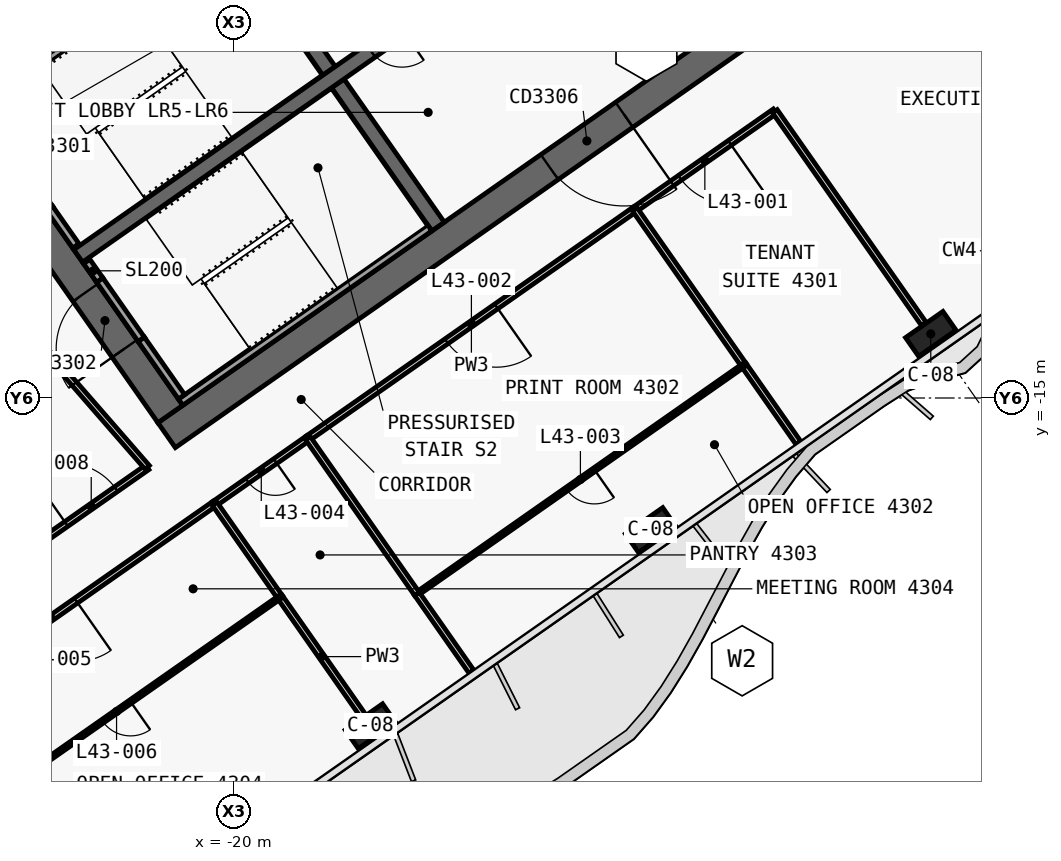
"""IFC4 building model, lengths in metres.
Left out: names, types, materials, properties, quantities, classifications, styles, units other than length and angle.
Written with IfcOpenShell. Run it as: python <this file> out.ifc"""

import sys

from ifc_helpers import new_model, si_unit, direction, frame, frame_2d, origin, origin_2d, place, context, subcontext, project, spatial, polyline, rectangle, outline, extrude, element, fill, save


model = new_model("IFC4")
c1 = context("Model", 3, precision=1e-05, world=origin(), true_north=direction((0.0, 1.0)))
c2 = subcontext(c1, "Body", "Model", "MODEL_VIEW")
j1 = project(units=[si_unit("LENGTHUNIT", "METRE"), si_unit("PLANEANGLEUNIT", "RADIAN")], contexts=[c1])
p1 = place(None, origin())
s1 = spatial("IfcSite", under=j1, at=p1, CompositionType="ELEMENT")
p2 = place(p1, origin())
s2 = spatial("IfcBuilding", under=s1, at=p2, CompositionType="ELEMENT")
p3 = place(p2, frame((0.0, 0.0, 186.6)))
s3 = spatial("IfcBuildingStorey", under=s2, at=p3, CompositionType="ELEMENT", Elevation=186.6)
p4 = place(p3, frame((0.029, 11.984, 0.0), z_axis=(0.0, 0.0, 1.0), x_axis=(-0.819151382952, -0.573577380837, 0.0)))
e1 = element("IfcWall", 1, at=p4, inside=s3, PredefinedType="SHEAR", context=c2, shape_type="SweptSolid", body=[
    extrude(outline(polyline([(33.898, 0.4), (0.56, 0.4), (-0.0, -0.4), (33.898, -0.4), (33.898, 0.4)])), origin(), (0.0, 0.0, 1.0), 3.9),
])
p5 = place(p3, frame((0.029, -0.712, 0.0), z_axis=(0.0, 0.0, 1.0), x_axis=(-0.819151758019, -0.573576845187, 0.0)))
e2 = element("IfcWall", 2, at=p5, inside=s3, PredefinedType="SHEAR", context=c2, shape_type="SweptSolid", body=[
    extrude(outline(polyline([(26.616, 0.4), (0.56, 0.4), (-0.0, -0.4), (26.616, -0.4), (26.616, 0.4)])), origin(), (0.0, 0.0, 1.0), 3.9),
])
p6 = place(p5, frame((2.966, 0.0, 0.0)))
e3 = element("IfcOpeningElement", 3, at=p6, cuts=e2, PredefinedType="OPENING", context=c2, shape_type="SweptSolid", body=[
    extrude(rectangle(XDim=2.4, YDim=2.1, at=frame_2d((1.2, 1.05))), frame((0.0, 0.41, 0.0), z_axis=(0.0, -1.0, 0.0), x_axis=(1.0, 0.0, 0.0)), (0.0, 0.0, 1.0), 0.82),
])
p7 = place(p5, frame((11.916, 0.0, 0.0)))
e4 = element("IfcOpeningElement", 4, at=p7, cuts=e2, PredefinedType="OPENING", context=c2, shape_type="SweptSolid", body=[
    extrude(rectangle(XDim=2.4, YDim=2.1, at=frame_2d((1.2, 1.05))), frame((0.0, 0.41, 0.0), z_axis=(0.0, -1.0, 0.0), x_axis=(1.0, 0.0, 0.0)), (0.0, 0.0, 1.0), 0.82),
])
p8 = place(p3, frame((-21.675, -15.421, 0.0), z_axis=(0.0, 0.0, 1.0), x_axis=(-0.573581815061, 0.819148278049, 0.0)))
e5 = element("IfcWall", 5, at=p8, inside=s3, PredefinedType="SHEAR", context=c2, shape_type="SweptSolid", body=[
    extrude(outline(polyline([(0.0, 0.4), (0.0, -0.4), (9.6, -0.4), (9.6, 0.4), (0.0, 0.4)])), origin(), (0.0, 0.0, 1.0), 3.9),
])
p9 = place(p8, frame((6.3, 0.0, 0.0)))
e6 = element("IfcOpeningElement", 6, at=p9, cuts=e5, PredefinedType="OPENING", context=c2, shape_type="SweptSolid", body=[
    extrude(rectangle(XDim=1.8, YDim=2.1, at=frame_2d((0.9, 1.05))), frame((0.0, 0.41, 0.0), z_axis=(0.0, -1.0, 0.0), x_axis=(1.0, 0.0, 0.0)), (0.0, 0.0, 1.0), 0.82),
])
p10 = place(p8, frame((2.1, 0.0, 0.0)))
e7 = element("IfcOpeningElement", 7, at=p10, cuts=e5, PredefinedType="OPENING", context=c2, shape_type="SweptSolid", body=[
    extrude(rectangle(XDim=1.8, YDim=2.1, at=frame_2d((0.9, 1.05))), frame((0.0, 0.41, 0.0), z_axis=(0.0, -1.0, 0.0), x_axis=(1.0, 0.0, 0.0)), (0.0, 0.0, 1.0), 0.82),
])
p11 = place(p3, frame((-14.63, -10.488, 0.0), z_axis=(0.0, 0.0, 1.0), x_axis=(-0.573611936273, 0.819127185829, 0.0)))
e8 = element("IfcWall", 8, at=p11, inside=s3, PredefinedType="SHEAR", context=c2, shape_type="SweptSolid", body=[
    extrude(outline(polyline([(4.6, 0.2), (0.0, 0.2), (0.0, -0.2), (4.6, -0.2), (4.6, 0.2)])), origin(), (0.0, 0.0, 1.0), 3.9),
])
p12 = place(p3, frame((-17.498, -6.392, 0.0), z_axis=(0.0, 0.0, 1.0), x_axis=(-0.573611936273, 0.819127185829, 0.0)))
e9 = element("IfcWall", 9, at=p12, inside=s3, PredefinedType="SHEAR", context=c2, shape_type="SweptSolid", body=[
    extrude(outline(polyline([(4.6, -0.2), (4.6, 0.2), (0.0, 0.2), (0.0, -0.2), (4.6, -0.2)])), origin(), (0.0, 0.0, 1.0), 3.9),
])
p13 = place(p3, frame((-2.638, 3.768, 0.0), z_axis=(0.0, 0.0, 1.0), x_axis=(-0.81915267502, -0.573575535572, 0.0)))
e10 = element("IfcWall", 10, at=p13, inside=s3, PredefinedType="SHEAR", context=c2, shape_type="SweptSolid", body=[
    extrude(outline(polyline([(26.2, 0.2), (0.0, 0.2), (0.0, -0.2), (26.2, -0.2), (26.2, 0.2)])), origin(), (0.0, 0.0, 1.0), 3.9),
])
p14 = place(p13, frame((1.169, 0.0, 0.0)))
e11 = element("IfcOpeningElement", 11, at=p14, cuts=e10, PredefinedType="OPENING", context=c2, shape_type="SweptSolid", body=[
    extrude(rectangle(XDim=1.1, YDim=2.1, at=frame_2d((0.55, 1.05))), frame((0.0, 0.21, 0.0), z_axis=(0.0, -1.0, 0.0), x_axis=(1.0, 0.0, 0.0)), (0.0, 0.0, 1.0), 0.42),
])
p15 = place(p13, frame((3.206, 0.0, 0.0)))
e12 = element("IfcOpeningElement", 12, at=p15, cuts=e10, PredefinedType="OPENING", context=c2, shape_type="SweptSolid", body=[
    extrude(rectangle(XDim=1.1, YDim=2.1, at=frame_2d((0.55, 1.05))), frame((0.0, 0.21, 0.0), z_axis=(0.0, -1.0, 0.0), x_axis=(1.0, 0.0, 0.0)), (0.0, 0.0, 1.0), 0.42),
])
p16 = place(p13, frame((5.244, 0.0, 0.0)))
e13 = element("IfcOpeningElement", 13, at=p16, cuts=e10, PredefinedType="OPENING", context=c2, shape_type="SweptSolid", body=[
    extrude(rectangle(XDim=1.1, YDim=2.1, at=frame_2d((0.55, 1.05))), frame((0.0, 0.21, 0.0), z_axis=(0.0, -1.0, 0.0), x_axis=(1.0, 0.0, 0.0)), (0.0, 0.0, 1.0), 0.42),
])
p17 = place(p13, frame((7.281, 0.0, 0.0)))
e14 = element("IfcOpeningElement", 14, at=p17, cuts=e10, PredefinedType="OPENING", context=c2, shape_type="SweptSolid", body=[
    extrude(rectangle(XDim=1.1, YDim=2.1, at=frame_2d((0.55, 1.05))), frame((0.0, 0.21, 0.0), z_axis=(0.0, -1.0, 0.0), x_axis=(1.0, 0.0, 0.0)), (0.0, 0.0, 1.0), 0.42),
])
p18 = place(p13, frame((9.688, 0.0, 0.0)))
e15 = element("IfcOpeningElement", 15, at=p18, cuts=e10, PredefinedType="OPENING", context=c2, shape_type="SweptSolid", body=[
    extrude(rectangle(XDim=1.1, YDim=2.1, at=frame_2d((0.55, 1.05))), frame((0.0, 0.21, 0.0), z_axis=(0.0, -1.0, 0.0), x_axis=(1.0, 0.0, 0.0)), (0.0, 0.0, 1.0), 0.42),
])
p19 = place(p13, frame((11.863, 0.0, 0.0)))
e16 = element("IfcOpeningElement", 16, at=p19, cuts=e10, PredefinedType="OPENING", context=c2, shape_type="SweptSolid", body=[
    extrude(rectangle(XDim=1.1, YDim=2.1, at=frame_2d((0.55, 1.05))), frame((0.0, 0.21, 0.0), z_axis=(0.0, -1.0, 0.0), x_axis=(1.0, 0.0, 0.0)), (0.0, 0.0, 1.0), 0.42),
])
p20 = place(p13, frame((13.722, 0.0, 0.0)))
e17 = element("IfcOpeningElement", 17, at=p20, cuts=e10, PredefinedType="OPENING", context=c2, shape_type="SweptSolid", body=[
    extrude(rectangle(XDim=1.0, YDim=2.1, at=frame_2d((0.5, 1.05))), frame((0.0, 0.21, 0.0), z_axis=(0.0, -1.0, 0.0), x_axis=(1.0, 0.0, 0.0)), (0.0, 0.0, 1.0), 0.42),
])
p21 = place(p13, frame((15.798, 0.0, 0.0)))
e18 = element("IfcOpeningElement", 18, at=p21, cuts=e10, PredefinedType="OPENING", context=c2, shape_type="SweptSolid", body=[
    extrude(rectangle(XDim=1.0, YDim=2.1, at=frame_2d((0.5, 1.05))), frame((0.0, 0.21, 0.0), z_axis=(0.0, -1.0, 0.0), x_axis=(1.0, 0.0, 0.0)), (0.0, 0.0, 1.0), 0.42),
])
for number, where, z_axis, x_axis in (
    (19, (-1.665, -13.313, 0.0), (0.0, 0.0, 1.0), (-0.819, -0.574, 0.0)),
    (20, (-9.038, -18.475, 0.0), (0.0, 0.0, 1.0), (-0.819, -0.574, 0.0)),
    (21, (-16.41, -23.637, 0.0), (0.0, 0.0, 1.0), (-0.819, -0.574, 0.0)),
):
    element("IfcColumn", number, at=place(p3, frame(where, z_axis=z_axis, x_axis=x_axis)), inside=s3, PredefinedType="COLUMN", context=c2, shape_type="SweptSolid", body=[
        extrude(rectangle(XDim=1.2, YDim=0.6, at=origin_2d()), origin(), (0.0, 0.0, 1.0), 3.9),
    ])
p22 = place(p3, frame((-20.243, -2.821, 0.0), z_axis=(0.0, 0.0, 1.0), x_axis=(-0.819141584393, -0.57359137434, 0.0)))
e22 = element("IfcWall", 22, at=p22, inside=s3, PredefinedType="SOLIDWALL", context=c2, shape_type="SweptSolid", body=[
    extrude(rectangle(XDim=8.0, YDim=0.2, at=frame_2d((4.0, 0.0))), origin(), (0.0, 0.0, 1.0), 3.62),
])
p23 = place(p3, frame((-24.162, -10.998, 0.0), z_axis=(0.0, 0.0, 1.0), x_axis=(-0.573612502218, 0.819126789514, 0.0)))
e23 = element("IfcWall", 23, at=p23, inside=s3, PredefinedType="SOLIDWALL", context=c2, shape_type="SweptSolid", body=[
    extrude(rectangle(XDim=1.2, YDim=0.2, at=frame_2d((0.6, 0.0))), origin(), (0.0, 0.0, 1.0), 3.62),
])
p24 = place(p3, frame((-24.85, -10.014, 2.15), z_axis=(0.0, 0.0, 1.0), x_axis=(-0.573505465124, 0.819201734296, 0.0)))
e24 = element("IfcWall", 24, at=p24, inside=s3, PredefinedType="SOLIDWALL", context=c2, shape_type="SweptSolid", body=[
    extrude(rectangle(XDim=1.9, YDim=0.2, at=frame_2d((0.95, 0.0))), origin(), (0.0, 0.0, 1.0), 1.47),
])
p25 = place(p3, frame((-14.851, -10.521, 0.0), z_axis=(0.0, 0.0, 1.0), x_axis=(-0.819141584393, -0.57359137434, 0.0)))
e25 = element("IfcWall", 25, at=p25, inside=s3, PredefinedType="SOLIDWALL", context=c2, shape_type="SweptSolid", body=[
    extrude(rectangle(XDim=8.0, YDim=0.2, at=frame_2d((4.0, 0.0))), origin(), (0.0, 0.0, 1.0), 3.62),
])
p26 = place(p3, frame((-21.38, -14.97, 0.0), z_axis=(0.0, 0.0, 1.0), x_axis=(-0.573559770908, 0.819163713305, 0.0)))
e26 = element("IfcWall", 26, at=p26, inside=s3, PredefinedType="SOLIDWALL", context=c2, shape_type="SweptSolid", body=[
    extrude(rectangle(XDim=1.85, YDim=0.2, at=frame_2d((0.925, 0.0))), origin(), (0.0, 0.0, 1.0), 3.62),
])
p27 = place(p3, frame((-23.531, -11.898, 0.0), z_axis=(0.0, 0.0, 1.0), x_axis=(-0.573708088123, 0.819059844958, 0.0)))
e27 = element("IfcWall", 27, at=p27, inside=s3, PredefinedType="SOLIDWALL", context=c2, shape_type="SweptSolid", body=[
    extrude(rectangle(XDim=0.6, YDim=0.2, at=frame_2d((0.3, 0.0))), origin(), (0.0, 0.0, 1.0), 3.62),
])
p28 = place(p3, frame((-22.441, -13.455, 2.15), z_axis=(0.0, 0.0, 1.0), x_axis=(-0.573591692345, 0.819141361715, 0.0)))
e28 = element("IfcWall", 28, at=p28, inside=s3, PredefinedType="SOLIDWALL", context=c2, shape_type="SweptSolid", body=[
    extrude(rectangle(XDim=1.9, YDim=0.2, at=frame_2d((0.95, 0.0))), origin(), (0.0, 0.0, 1.0), 1.47),
])
p29 = place(p3, frame((-25.231, -18.888, 0.0), z_axis=(0.0, 0.0, 1.0), x_axis=(0.819152236293, 0.573576162141, 0.0)))
e29 = element("IfcWall", 29, at=p29, inside=s3, PredefinedType="PARTITIONING", context=c2, shape_type="SweptSolid", body=[
    extrude(rectangle(XDim=3.599, YDim=0.15, at=frame_2d((1.799, 0.0))), origin(), (0.0, 0.0, 1.0), 3.0),
])
p30 = place(p29, frame((1.0, 0.0, 0.0)))
e30 = element("IfcOpeningElement", 30, at=p30, cuts=e29, PredefinedType="OPENING", context=c2, shape_type="SweptSolid", body=[
    extrude(rectangle(XDim=1.6, YDim=2.1, at=frame_2d((0.8, 1.05))), frame((0.0, 0.085, 0.0), z_axis=(0.0, -1.0, 0.0), x_axis=(1.0, 0.0, 0.0)), (0.0, 0.0, 1.0), 0.17),
])
p31 = place(p3, frame((-5.766, -7.456, 0.0), z_axis=(0.0, 0.0, 1.0), x_axis=(-0.819142740634, -0.573589723117, 0.0)))
e31 = element("IfcWall", 31, at=p31, inside=s3, PredefinedType="PARTITIONING", context=c2, shape_type="SweptSolid", body=[
    extrude(rectangle(XDim=4.502, YDim=0.15, at=frame_2d((2.251, 0.0))), origin(), (0.0, 0.0, 1.0), 3.0),
])
p32 = place(p31, frame((1.451, 0.0, 0.0)))
e32 = element("IfcOpeningElement", 32, at=p32, cuts=e31, PredefinedType="OPENING", context=c2, shape_type="SweptSolid", body=[
    extrude(rectangle(XDim=1.6, YDim=2.1, at=frame_2d((0.8, 1.05))), frame((0.0, 0.085, 0.0), z_axis=(0.0, -1.0, 0.0), x_axis=(1.0, 0.0, 0.0)), (0.0, 0.0, 1.0), 0.17),
])
p33 = place(p3, frame((-9.451, -10.036, 0.0), z_axis=(0.0, 0.0, 1.0), x_axis=(-0.819164214721, -0.57355905478, 0.0)))
e33 = element("IfcWall", 33, at=p33, inside=s3, PredefinedType="PARTITIONING", context=c2, shape_type="SweptSolid", body=[
    extrude(rectangle(XDim=10.504, YDim=0.15, at=frame_2d((5.252, 0.0))), origin(), (0.0, 0.0, 1.0), 3.0),
])
p34 = place(p33, frame((4.452, 0.0, 0.0)))
e34 = element("IfcOpeningElement", 34, at=p34, cuts=e33, PredefinedType="OPENING", context=c2, shape_type="SweptSolid", body=[
    extrude(rectangle(XDim=1.6, YDim=2.1, at=frame_2d((0.8, 1.05))), frame((0.0, 0.085, 0.0), z_axis=(0.0, -1.0, 0.0), x_axis=(1.0, 0.0, 0.0)), (0.0, 0.0, 1.0), 0.17),
])
p35 = place(p3, frame((-18.052, -16.058, 0.0), z_axis=(0.0, 0.0, 1.0), x_axis=(-0.819128818764, -0.573609604409, 0.0)))
e35 = element("IfcWall", 35, at=p35, inside=s3, PredefinedType="PARTITIONING", context=c2, shape_type="SweptSolid", body=[
    extrude(rectangle(XDim=3.004, YDim=0.15, at=frame_2d((1.502, 0.0))), origin(), (0.0, 0.0, 1.0), 3.0),
])
p36 = place(p35, frame((1.052, 0.0, 0.0)))
e36 = element("IfcOpeningElement", 36, at=p36, cuts=e35, PredefinedType="OPENING", context=c2, shape_type="SweptSolid", body=[
    extrude(rectangle(XDim=0.9, YDim=2.1, at=frame_2d((0.45, 1.05))), frame((0.0, 0.085, 0.0), z_axis=(0.0, -1.0, 0.0), x_axis=(1.0, 0.0, 0.0)), (0.0, 0.0, 1.0), 0.17),
])
p37 = place(p3, frame((-20.51, -17.779, 0.0), z_axis=(0.0, 0.0, 1.0), x_axis=(-0.819145647741, -0.57358557146, 0.0)))
e37 = element("IfcWall", 37, at=p37, inside=s3, PredefinedType="PARTITIONING", context=c2, shape_type="SweptSolid", body=[
    extrude(rectangle(XDim=10.504, YDim=0.15, at=frame_2d((5.252, 0.0))), origin(), (0.0, 0.0, 1.0), 3.0),
])
p38 = place(p37, frame((4.452, 0.0, 0.0)))
e38 = element("IfcOpeningElement", 38, at=p38, cuts=e37, PredefinedType="OPENING", context=c2, shape_type="SweptSolid", body=[
    extrude(rectangle(XDim=1.6, YDim=2.1, at=frame_2d((0.8, 1.05))), frame((0.0, 0.085, 0.0), z_axis=(0.0, -1.0, 0.0), x_axis=(1.0, 0.0, 0.0)), (0.0, 0.0, 1.0), 0.17),
])
p39 = place(p3, frame((-1.849, -13.051, 0.0), z_axis=(0.0, 0.0, 1.0), x_axis=(-0.57357985571, 0.819149650018, 0.0)))
e39 = element("IfcWall", 39, at=p39, inside=s3, PredefinedType="PARTITIONING", context=c2, shape_type="SweptSolid", body=[
    extrude(rectangle(XDim=6.832, YDim=0.15, at=frame_2d((3.416, 0.0))), origin(), (0.0, 0.0, 1.0), 3.0),
])
p40 = place(p3, frame((-22.284, -16.826, 0.0), z_axis=(0.0, 0.0, 1.0), x_axis=(-0.656758142177, 0.754101281449, 0.0)))
e40 = element("IfcWall", 40, at=p40, inside=s3, PredefinedType="PARTITIONING", context=c2, shape_type="SweptSolid", body=[
    extrude(rectangle(XDim=6.539, YDim=0.15, at=frame_2d((3.269, 0.0))), origin(), (0.0, 0.0, 1.0), 3.0),
])
p41 = place(p3, frame((-5.151, -16.18, 0.0), z_axis=(0.0, 0.0, 1.0), x_axis=(-0.573613022702, 0.819126425033, 0.0)))
e41 = element("IfcWall", 41, at=p41, inside=s3, PredefinedType="PARTITIONING", context=c2, shape_type="SweptSolid", body=[
    extrude(rectangle(XDim=2.501, YDim=0.15, at=frame_2d((1.25, 0.0))), origin(), (0.0, 0.0, 1.0), 2.9),
])
p42 = place(p3, frame((-6.583, -14.134, 0.0), z_axis=(0.0, 0.0, 1.0), x_axis=(-0.573557338351, 0.819165416521, 0.0)))
e42 = element("IfcWall", 42, at=p42, inside=s3, PredefinedType="PARTITIONING", context=c2, shape_type="SweptSolid", body=[
    extrude(rectangle(XDim=5.002, YDim=0.15, at=frame_2d((2.501, 0.0))), origin(), (0.0, 0.0, 1.0), 3.62),
])
p43 = place(p3, frame((-6.584, -14.134, 0.0), z_axis=(0.0, 0.0, 1.0), x_axis=(-0.819163097304, -0.573560650686, 0.0)))
e43 = element("IfcWall", 43, at=p43, inside=s3, PredefinedType="PARTITIONING", context=c2, shape_type="SweptSolid", body=[
    extrude(rectangle(XDim=10.5, YDim=0.1, at=frame_2d((5.25, 0.0))), origin(), (0.0, 0.0, 1.0), 3.0),
])
p44 = place(p43, frame((4.8, 0.0, 0.0)))
e44 = element("IfcOpeningElement", 44, at=p44, cuts=e43, PredefinedType="OPENING", context=c2, shape_type="SweptSolid", body=[
    extrude(rectangle(XDim=0.9, YDim=2.1, at=frame_2d((0.45, 1.05))), frame((0.0, 0.06, 0.0), z_axis=(0.0, -1.0, 0.0), x_axis=(1.0, 0.0, 0.0)), (0.0, 0.0, 1.0), 0.12),
])
p45 = place(p3, frame((-13.752, -22.203, 0.0), z_axis=(0.0, 0.0, 1.0), x_axis=(-0.573626239584, 0.819117169433, 0.0)))
e45 = element("IfcWall", 45, at=p45, inside=s3, PredefinedType="PARTITIONING", context=c2, shape_type="SweptSolid", body=[
    extrude(rectangle(XDim=2.499, YDim=0.15, at=frame_2d((1.25, 0.0))), origin(), (0.0, 0.0, 1.0), 2.9),
])
p46 = place(p3, frame((-15.186, -20.155, 0.0), z_axis=(0.0, 0.0, 1.0), x_axis=(-0.573586866468, 0.819144740944, 0.0)))
e46 = element("IfcWall", 46, at=p46, inside=s3, PredefinedType="PARTITIONING", context=c2, shape_type="SweptSolid", body=[
    extrude(rectangle(XDim=5.0, YDim=0.15, at=frame_2d((2.5, 0.0))), origin(), (0.0, 0.0, 1.0), 3.62),
])
p47 = place(p3, frame((-16.594, -23.375, 0.0), z_axis=(0.0, 0.0, 1.0), x_axis=(-0.57359919792, 0.819136105995, 0.0)))
e47 = element("IfcWall", 47, at=p47, inside=s3, PredefinedType="PARTITIONING", context=c2, shape_type="SweptSolid", body=[
    extrude(rectangle(XDim=3.831, YDim=0.15, at=frame_2d((1.916, 0.0))), origin(), (0.0, 0.0, 1.0), 3.0),
])
p48 = place(p3, frame((-18.789, -20.239, 0.0), z_axis=(0.0, 0.0, 1.0), x_axis=(-0.573549676934, 0.819170780783, 0.0)))
e48 = element("IfcWall", 48, at=p48, inside=s3, PredefinedType="PARTITIONING", context=c2, shape_type="SweptSolid", body=[
    extrude(rectangle(XDim=3.002, YDim=0.15, at=frame_2d((1.501, 0.0))), origin(), (0.0, 0.0, 1.0), 3.0),
])
p49 = place(p3, frame((-18.79, -20.239, 0.0), z_axis=(0.0, 0.0, 1.0), x_axis=(-0.819155448096, -0.573571575181, 0.0)))
e49 = element("IfcWall", 49, at=p49, inside=s3, PredefinedType="PARTITIONING", context=c2, shape_type="SweptSolid", body=[
    extrude(rectangle(XDim=10.5, YDim=0.1, at=frame_2d((5.25, 0.0))), origin(), (0.0, 0.0, 1.0), 3.0),
])
p50 = place(p49, frame((4.8, 0.0, 0.0)))
e50 = element("IfcOpeningElement", 50, at=p50, cuts=e49, PredefinedType="OPENING", context=c2, shape_type="SweptSolid", body=[
    extrude(rectangle(XDim=0.9, YDim=2.1, at=frame_2d((0.45, 1.05))), frame((0.0, 0.06, 0.0), z_axis=(0.0, -1.0, 0.0), x_axis=(1.0, 0.0, 0.0)), (0.0, 0.0, 1.0), 0.12),
])
p51 = place(p7, origin())
e51 = element("IfcDoor", 51, at=p51, inside=s3, OperationType="DOUBLE_DOOR_SINGLE_SWING", PredefinedType="DOOR", context=c2, shape_type="SweptSolid", body=[
    extrude(rectangle(XDim=2.4, YDim=2.1, at=frame_2d((1.2, 1.05))), frame((0.0, 0.025, 0.0), z_axis=(0.0, -1.0, 0.0), x_axis=(1.0, 0.0, 0.0)), (0.0, 0.0, 1.0), 0.05),
])
fill(e4, e51)
p52 = place(p10, origin())
e52 = element("IfcDoor", 52, at=p52, inside=s3, OperationType="DOUBLE_DOOR_SINGLE_SWING", PredefinedType="DOOR", context=c2, shape_type="SweptSolid", body=[
    extrude(rectangle(XDim=1.8, YDim=2.1, at=frame_2d((0.9, 1.05))), frame((0.0, 0.025, 0.0), z_axis=(0.0, -1.0, 0.0), x_axis=(1.0, 0.0, 0.0)), (0.0, 0.0, 1.0), 0.05),
])
fill(e7, e52)
p53 = place(p32, origin())
e53 = element("IfcDoor", 53, at=p53, inside=s3, OperationType="DOUBLE_DOOR_SINGLE_SWING", PredefinedType="DOOR", context=c2, shape_type="SweptSolid", body=[
    extrude(rectangle(XDim=1.6, YDim=2.1, at=frame_2d((0.8, 1.05))), frame((0.0, 0.025, 0.0), z_axis=(0.0, -1.0, 0.0), x_axis=(1.0, 0.0, 0.0)), (0.0, 0.0, 1.0), 0.05),
])
fill(e32, e53)
p54 = place(p34, origin())
e54 = element("IfcDoor", 54, at=p54, inside=s3, OperationType="DOUBLE_DOOR_SINGLE_SWING", PredefinedType="DOOR", context=c2, shape_type="SweptSolid", body=[
    extrude(rectangle(XDim=1.6, YDim=2.1, at=frame_2d((0.8, 1.05))), frame((0.0, 0.025, 0.0), z_axis=(0.0, -1.0, 0.0), x_axis=(1.0, 0.0, 0.0)), (0.0, 0.0, 1.0), 0.05),
])
fill(e34, e54)
p55 = place(p44, origin())
e55 = element("IfcDoor", 55, at=p55, inside=s3, OperationType="SINGLE_SWING_RIGHT", PredefinedType="DOOR", context=c2, shape_type="SweptSolid", body=[
    extrude(rectangle(XDim=0.9, YDim=2.1, at=frame_2d((0.45, 1.05))), frame((0.0, 0.025, 0.0), z_axis=(0.0, -1.0, 0.0), x_axis=(1.0, 0.0, 0.0)), (0.0, 0.0, 1.0), 0.05),
])
fill(e44, e55)
p56 = place(p36, origin())
e56 = element("IfcDoor", 56, at=p56, inside=s3, OperationType="SINGLE_SWING_LEFT", PredefinedType="DOOR", context=c2, shape_type="SweptSolid", body=[
    extrude(rectangle(XDim=0.9, YDim=2.1, at=frame_2d((0.45, 1.05))), frame((0.0, 0.025, 0.0), z_axis=(0.0, -1.0, 0.0), x_axis=(1.0, 0.0, 0.0)), (0.0, 0.0, 1.0), 0.05),
])
fill(e36, e56)
p57 = place(p38, origin())
e57 = element("IfcDoor", 57, at=p57, inside=s3, OperationType="DOUBLE_DOOR_SINGLE_SWING", PredefinedType="DOOR", context=c2, shape_type="SweptSolid", body=[
    extrude(rectangle(XDim=1.6, YDim=2.1, at=frame_2d((0.8, 1.05))), frame((0.0, 0.025, 0.0), z_axis=(0.0, -1.0, 0.0), x_axis=(1.0, 0.0, 0.0)), (0.0, 0.0, 1.0), 0.05),
])
fill(e38, e57)
p58 = place(p50, origin())
e58 = element("IfcDoor", 58, at=p58, inside=s3, OperationType="SINGLE_SWING_LEFT", PredefinedType="DOOR", context=c2, shape_type="SweptSolid", body=[
    extrude(rectangle(XDim=0.9, YDim=2.1, at=frame_2d((0.45, 1.05))), frame((0.0, 0.025, 0.0), z_axis=(0.0, -1.0, 0.0), x_axis=(1.0, 0.0, 0.0)), (0.0, 0.0, 1.0), 0.05),
])
fill(e50, e58)
p59 = place(p30, origin())
e59 = element("IfcDoor", 59, at=p59, inside=s3, OperationType="DOUBLE_DOOR_SINGLE_SWING", PredefinedType="DOOR", context=c2, shape_type="SweptSolid", body=[
    extrude(rectangle(XDim=1.6, YDim=2.1, at=frame_2d((0.8, 1.05))), frame((0.0, 0.025, 0.0), z_axis=(0.0, -1.0, 0.0), x_axis=(1.0, 0.0, 0.0)), (0.0, 0.0, 1.0), 0.05),
])
fill(e30, e59)
save(model, sys.argv[1])
